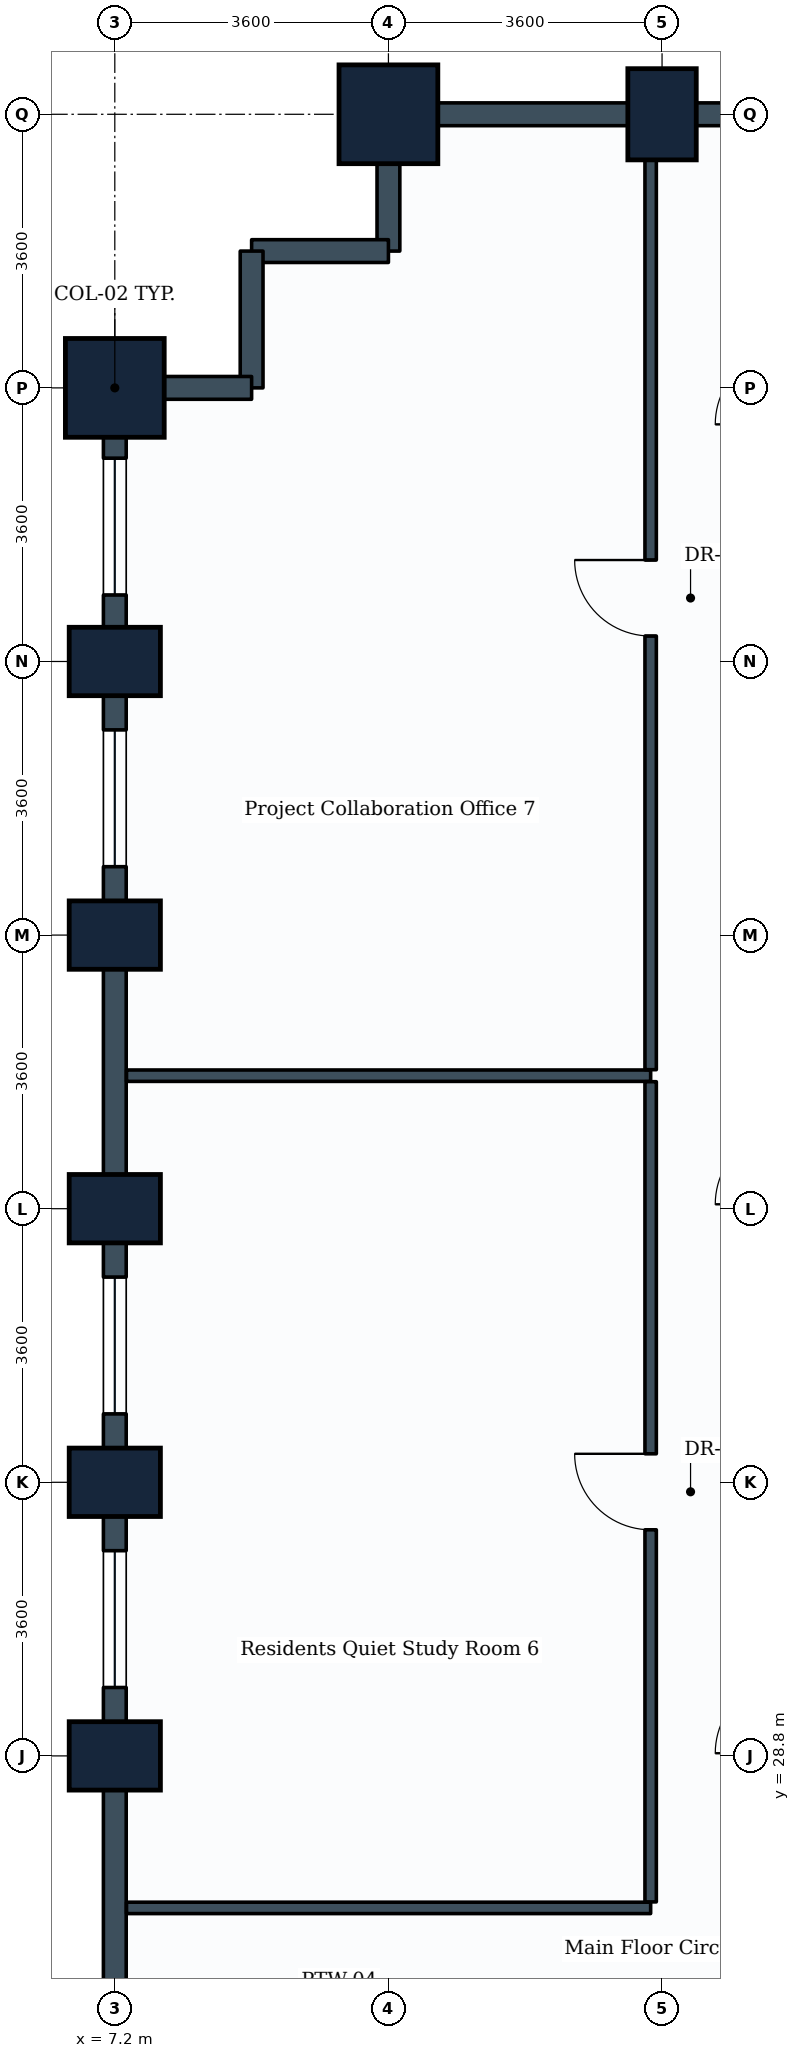
"""IFC4 building model, lengths in metres.
Left out: names, types, materials, properties, quantities, classifications, styles, units other than length and angle.
Written with IfcOpenShell. Run it as: python <this file> out.ifc"""

import sys

from ifc_helpers import new_model, si_unit, direction, frame, frame_2d, origin, origin_2d, place, context, subcontext, project, spatial, rectangle, extrude, element, fill, save


model = new_model("IFC4")
c1 = context("Model", 3, precision=1e-05, world=origin(), true_north=direction((0.0, 1.0)))
c2 = subcontext(c1, "Body", "Model", "MODEL_VIEW")
j1 = project(units=[si_unit("LENGTHUNIT", "METRE"), si_unit("PLANEANGLEUNIT", "RADIAN")], contexts=[c1])
p1 = place(None, origin())
s1 = spatial("IfcSite", under=j1, at=p1, CompositionType="ELEMENT")
p2 = place(p1, origin())
s2 = spatial("IfcBuilding", under=s1, at=p2, CompositionType="ELEMENT")
p3 = place(p2, frame((0.0, 0.0, 63.0)))
s3 = spatial("IfcBuildingStorey", under=s2, at=p3, CompositionType="ELEMENT", Elevation=63.0)
for number, where, z_axis, x_axis in (
    (1, (7.2, 28.8, 0.0), (0.0, 0.0, 1.0), (0.0, 1.0, 0.0)),
    (2, (7.2, 32.4, 0.0), (0.0, 0.0, 1.0), (0.0, 1.0, 0.0)),
    (3, (7.2, 36.0, 0.0), (0.0, 0.0, 1.0), (0.0, 1.0, 0.0)),
    (4, (7.2, 39.6, 0.0), (0.0, 0.0, 1.0), (0.0, 1.0, 0.0)),
    (5, (7.2, 43.2, 0.0), (0.0, 0.0, 1.0), (0.0, 1.0, 0.0)),
):
    element("IfcColumn", number, at=place(p3, frame(where, z_axis=z_axis, x_axis=x_axis)), inside=s3, PredefinedType="COLUMN", context=c2, shape_type="SweptSolid", body=[
        extrude(rectangle(XDim=0.9, YDim=1.2, at=origin_2d()), origin(), (0.0, 0.0, 1.0), 3.9),
    ])
for number, where, z_axis, x_axis in (
    (6, (7.2, 46.8, 0.0), (0.0, 0.0, 1.0), (0.0, 1.0, 0.0)),
    (7, (10.8, 50.4, 0.0), (0.0, 0.0, 1.0), (1.0, 0.0, 0.0)),
):
    element("IfcColumn", number, at=place(p3, frame(where, z_axis=z_axis, x_axis=x_axis)), inside=s3, PredefinedType="COLUMN", context=c2, shape_type="SweptSolid", body=[
        extrude(rectangle(XDim=1.3, YDim=1.3, at=origin_2d()), origin(), (0.0, 0.0, 1.0), 3.9),
    ])
p4 = place(p3, frame((14.4, 50.4, 0.0), z_axis=(0.0, 0.0, 1.0), x_axis=(1.0, 0.0, 0.0)))
e8 = element("IfcColumn", 8, at=p4, inside=s3, PredefinedType="COLUMN", context=c2, shape_type="SweptSolid", body=[
    extrude(rectangle(XDim=0.9, YDim=1.2, at=origin_2d()), origin(), (0.0, 0.0, 1.0), 3.9),
])
p5 = place(p3, frame((14.4, 50.4, 0.0), z_axis=(0.0, 0.0, 1.0), x_axis=(1.0, 0.0, 0.0)))
e9 = element("IfcWall", 9, at=p5, inside=s3, PredefinedType="STANDARD", context=c2, shape_type="SweptSolid", body=[
    extrude(rectangle(XDim=3.6, YDim=0.3, at=frame_2d((1.8, 0.0))), origin(), (0.0, 0.0, 1.0), 2.93),
])
p6 = place(p3, frame((10.8, 50.4, 0.0), z_axis=(0.0, 0.0, 1.0), x_axis=(1.0, 0.0, 0.0)))
e10 = element("IfcWall", 10, at=p6, inside=s3, PredefinedType="STANDARD", context=c2, shape_type="SweptSolid", body=[
    extrude(rectangle(XDim=3.6, YDim=0.3, at=frame_2d((1.8, 0.0))), origin(), (0.0, 0.0, 1.0), 2.93),
])
p7 = place(p3, frame((10.8, 48.6, 0.0), z_axis=(0.0, 0.0, 1.0), x_axis=(0.0, 1.0, 0.0)))
e11 = element("IfcWall", 11, at=p7, inside=s3, PredefinedType="STANDARD", context=c2, shape_type="SweptSolid", body=[
    extrude(rectangle(XDim=1.8, YDim=0.3, at=frame_2d((0.9, 0.0))), origin(), (0.0, 0.0, 1.0), 2.93),
])
for number, where, z_axis, x_axis in (
    (12, (9.0, 48.6, 0.0), (0.0, 0.0, 1.0), (1.0, 0.0, 0.0)),
    (13, (9.0, 46.8, 0.0), (0.0, 0.0, 1.0), (0.0, 1.0, 0.0)),
):
    element("IfcWall", number, at=place(p3, frame(where, z_axis=z_axis, x_axis=x_axis)), inside=s3, PredefinedType="STANDARD", context=c2, shape_type="SweptSolid", body=[
        extrude(rectangle(XDim=1.8, YDim=0.3, at=frame_2d((0.9, 0.0))), origin(), (0.0, 0.0, 1.0), 3.635),
    ])
p8 = place(p3, frame((7.2, 46.8, 0.0), z_axis=(0.0, 0.0, 1.0), x_axis=(1.0, 0.0, 0.0)))
e14 = element("IfcWall", 14, at=p8, inside=s3, PredefinedType="STANDARD", context=c2, shape_type="SweptSolid", body=[
    extrude(rectangle(XDim=1.8, YDim=0.3, at=frame_2d((0.9, 0.0))), origin(), (0.0, 0.0, 1.0), 2.93),
])
p9 = place(p3, frame((7.2, 43.2, 0.0), z_axis=(0.0, 0.0, 1.0), x_axis=(0.0, 1.0, 0.0)))
e15 = element("IfcWall", 15, at=p9, inside=s3, PredefinedType="STANDARD", context=c2, shape_type="SweptSolid", body=[
    extrude(rectangle(XDim=3.6, YDim=0.3, at=frame_2d((1.8, 0.0))), origin(), (0.0, 0.0, 1.0), 2.93),
])
p10 = place(p9, frame((0.875, 0.0, 0.85)))
e16 = element("IfcOpeningElement", 16, at=p10, cuts=e15, PredefinedType="OPENING", context=c2, shape_type="SweptSolid", body=[
    extrude(rectangle(XDim=1.8, YDim=1.35, at=frame_2d((0.9, 0.675))), frame((0.0, 0.16, 0.0), z_axis=(0.0, -1.0, 0.0), x_axis=(1.0, 0.0, 0.0)), (0.0, 0.0, 1.0), 0.32),
])
p11 = place(p3, frame((7.2, 39.6, 0.0), z_axis=(0.0, 0.0, 1.0), x_axis=(0.0, 1.0, 0.0)))
e17 = element("IfcWall", 17, at=p11, inside=s3, PredefinedType="STANDARD", context=c2, shape_type="SweptSolid", body=[
    extrude(rectangle(XDim=3.6, YDim=0.3, at=frame_2d((1.8, 0.0))), origin(), (0.0, 0.0, 1.0), 2.93),
])
p12 = place(p11, frame((0.9, 0.0, 0.85)))
e18 = element("IfcOpeningElement", 18, at=p12, cuts=e17, PredefinedType="OPENING", context=c2, shape_type="SweptSolid", body=[
    extrude(rectangle(XDim=1.8, YDim=1.35, at=frame_2d((0.9, 0.675))), frame((0.0, 0.16, 0.0), z_axis=(0.0, -1.0, 0.0), x_axis=(1.0, 0.0, 0.0)), (0.0, 0.0, 1.0), 0.32),
])
p13 = place(p3, frame((7.2, 36.0, 0.0), z_axis=(0.0, 0.0, 1.0), x_axis=(0.0, 1.0, 0.0)))
e19 = element("IfcWall", 19, at=p13, inside=s3, PredefinedType="STANDARD", context=c2, shape_type="SweptSolid", body=[
    extrude(rectangle(XDim=3.6, YDim=0.3, at=frame_2d((1.8, 0.0))), origin(), (0.0, 0.0, 1.0), 2.93),
])
p14 = place(p3, frame((7.2, 32.4, 0.0), z_axis=(0.0, 0.0, 1.0), x_axis=(0.0, 1.0, 0.0)))
e20 = element("IfcWall", 20, at=p14, inside=s3, PredefinedType="STANDARD", context=c2, shape_type="SweptSolid", body=[
    extrude(rectangle(XDim=3.6, YDim=0.3, at=frame_2d((1.8, 0.0))), origin(), (0.0, 0.0, 1.0), 2.93),
])
p15 = place(p14, frame((0.9, 0.0, 0.85)))
e21 = element("IfcOpeningElement", 21, at=p15, cuts=e20, PredefinedType="OPENING", context=c2, shape_type="SweptSolid", body=[
    extrude(rectangle(XDim=1.8, YDim=1.35, at=frame_2d((0.9, 0.675))), frame((0.0, 0.16, 0.0), z_axis=(0.0, -1.0, 0.0), x_axis=(1.0, 0.0, 0.0)), (0.0, 0.0, 1.0), 0.32),
])
p16 = place(p3, frame((7.2, 28.8, 0.0), z_axis=(0.0, 0.0, 1.0), x_axis=(0.0, 1.0, 0.0)))
e22 = element("IfcWall", 22, at=p16, inside=s3, PredefinedType="STANDARD", context=c2, shape_type="SweptSolid", body=[
    extrude(rectangle(XDim=3.6, YDim=0.3, at=frame_2d((1.8, 0.0))), origin(), (0.0, 0.0, 1.0), 2.93),
])
p17 = place(p16, frame((0.9, 0.0, 0.85)))
e23 = element("IfcOpeningElement", 23, at=p17, cuts=e22, PredefinedType="OPENING", context=c2, shape_type="SweptSolid", body=[
    extrude(rectangle(XDim=1.8, YDim=1.35, at=frame_2d((0.9, 0.675))), frame((0.0, 0.16, 0.0), z_axis=(0.0, -1.0, 0.0), x_axis=(1.0, 0.0, 0.0)), (0.0, 0.0, 1.0), 0.32),
])
p18 = place(p3, frame((7.2, 25.2, 0.0), z_axis=(0.0, 0.0, 1.0), x_axis=(0.0, 1.0, 0.0)))
e24 = element("IfcWall", 24, at=p18, inside=s3, PredefinedType="STANDARD", context=c2, shape_type="SweptSolid", body=[
    extrude(rectangle(XDim=3.6, YDim=0.3, at=frame_2d((1.8, 0.0))), origin(), (0.0, 0.0, 1.0), 2.93),
])
for number, where, z_axis, x_axis in (
    (25, (7.354, 26.8, 0.0), (0.0, 0.0, 1.0), (1.0, 0.0, 0.0)),
    (26, (7.354, 37.75, 0.0), (0.0, 0.0, 1.0), (1.0, 0.0, 0.0)),
):
    element("IfcWall", number, at=place(p3, frame(where, z_axis=z_axis, x_axis=x_axis)), inside=s3, PredefinedType="PARTITIONING", context=c2, shape_type="SweptSolid", body=[
        extrude(rectangle(XDim=6.896, YDim=0.15, at=frame_2d((3.448, 0.0))), origin(), (0.0, 0.0, 1.0), 2.93),
    ])
p19 = place(p3, frame((14.25, 26.879, 0.0), z_axis=(0.0, 0.0, 1.0), x_axis=(0.0, 1.0, 0.0)))
e27 = element("IfcWall", 27, at=p19, inside=s3, PredefinedType="PARTITIONING", context=c2, shape_type="SweptSolid", body=[
    extrude(rectangle(XDim=10.792, YDim=0.15, at=frame_2d((5.396, 0.0))), origin(), (0.0, 0.0, 1.0), 3.03),
])
p20 = place(p19, frame((4.896, 0.0, 0.0)))
e28 = element("IfcOpeningElement", 28, at=p20, cuts=e27, PredefinedType="OPENING", context=c2, shape_type="SweptSolid", body=[
    extrude(rectangle(XDim=1.0, YDim=2.1, at=frame_2d((0.5, 1.05))), frame((0.0, 0.085, 0.0), z_axis=(0.0, -1.0, 0.0), x_axis=(1.0, 0.0, 0.0)), (0.0, 0.0, 1.0), 0.17),
])
p21 = place(p3, frame((14.25, 37.829, 0.0), z_axis=(0.0, 0.0, 1.0), x_axis=(0.0, 1.0, 0.0)))
e29 = element("IfcWall", 29, at=p21, inside=s3, PredefinedType="PARTITIONING", context=c2, shape_type="SweptSolid", body=[
    extrude(rectangle(XDim=12.417, YDim=0.15, at=frame_2d((6.208, 0.0))), origin(), (0.0, 0.0, 1.0), 2.93),
])
p22 = place(p21, frame((5.706, 0.0, 0.0)))
e30 = element("IfcOpeningElement", 30, at=p22, cuts=e29, PredefinedType="OPENING", context=c2, shape_type="SweptSolid", body=[
    extrude(rectangle(XDim=1.0, YDim=2.1, at=frame_2d((0.5, 1.05))), frame((0.0, 0.085, 0.0), z_axis=(0.0, -1.0, 0.0), x_axis=(1.0, 0.0, 0.0)), (0.0, 0.0, 1.0), 0.17),
])
p23 = place(p10, origin())
e31 = element("IfcWindow", 31, at=p23, inside=s3, PartitioningType="SINGLE_PANEL", PredefinedType="WINDOW", context=c2, shape_type="SweptSolid", body=[
    extrude(rectangle(XDim=1.8, YDim=1.35, at=frame_2d((0.9, 0.675))), frame((0.0, 0.03, 0.0), z_axis=(0.0, -1.0, 0.0), x_axis=(1.0, 0.0, 0.0)), (0.0, 0.0, 1.0), 0.06),
])
fill(e16, e31)
p24 = place(p12, origin())
e32 = element("IfcWindow", 32, at=p24, inside=s3, PartitioningType="SINGLE_PANEL", PredefinedType="WINDOW", context=c2, shape_type="SweptSolid", body=[
    extrude(rectangle(XDim=1.8, YDim=1.35, at=frame_2d((0.9, 0.675))), frame((0.0, 0.03, 0.0), z_axis=(0.0, -1.0, 0.0), x_axis=(1.0, 0.0, 0.0)), (0.0, 0.0, 1.0), 0.06),
])
fill(e18, e32)
p25 = place(p15, origin())
e33 = element("IfcWindow", 33, at=p25, inside=s3, PartitioningType="SINGLE_PANEL", PredefinedType="WINDOW", context=c2, shape_type="SweptSolid", body=[
    extrude(rectangle(XDim=1.8, YDim=1.35, at=frame_2d((0.9, 0.675))), frame((0.0, 0.03, 0.0), z_axis=(0.0, -1.0, 0.0), x_axis=(1.0, 0.0, 0.0)), (0.0, 0.0, 1.0), 0.06),
])
fill(e21, e33)
p26 = place(p17, origin())
e34 = element("IfcWindow", 34, at=p26, inside=s3, PartitioningType="SINGLE_PANEL", PredefinedType="WINDOW", context=c2, shape_type="SweptSolid", body=[
    extrude(rectangle(XDim=1.8, YDim=1.35, at=frame_2d((0.9, 0.675))), frame((0.0, 0.03, 0.0), z_axis=(0.0, -1.0, 0.0), x_axis=(1.0, 0.0, 0.0)), (0.0, 0.0, 1.0), 0.06),
])
fill(e23, e34)
p27 = place(p20, origin())
e35 = element("IfcDoor", 35, at=p27, inside=s3, OperationType="SINGLE_SWING_RIGHT", PredefinedType="DOOR", context=c2, shape_type="SweptSolid", body=[
    extrude(rectangle(XDim=1.0, YDim=2.1, at=frame_2d((0.5, 1.05))), frame((0.0, 0.025, 0.0), z_axis=(0.0, -1.0, 0.0), x_axis=(1.0, 0.0, 0.0)), (0.0, 0.0, 1.0), 0.05),
])
fill(e28, e35)
p28 = place(p22, origin())
e36 = element("IfcDoor", 36, at=p28, inside=s3, OperationType="SINGLE_SWING_RIGHT", PredefinedType="DOOR", context=c2, shape_type="SweptSolid", body=[
    extrude(rectangle(XDim=1.0, YDim=2.1, at=frame_2d((0.5, 1.05))), frame((0.0, 0.025, 0.0), z_axis=(0.0, -1.0, 0.0), x_axis=(1.0, 0.0, 0.0)), (0.0, 0.0, 1.0), 0.05),
])
fill(e30, e36)
save(model, sys.argv[1])
